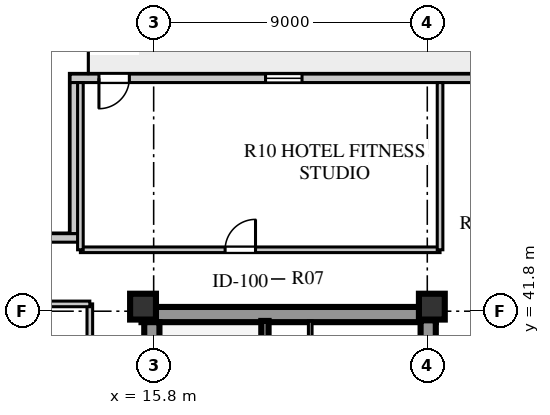
"""IFC4 building model, lengths in metres.
Left out: names, types, materials, properties, quantities, classifications, styles, units other than length and angle.
Written with IfcOpenShell. Run it as: python <this file> out.ifc"""

import sys

from ifc_helpers import new_model, si_unit, direction, frame, frame_2d, origin, origin_2d, place, context, subcontext, project, spatial, rectangle, extrude, element, fill, save


model = new_model("IFC4")
c1 = context("Model", 3, precision=1e-05, world=origin(), true_north=direction((0.0, 1.0)))
c2 = subcontext(c1, "Body", "Model", "MODEL_VIEW")
j1 = project(units=[si_unit("LENGTHUNIT", "METRE"), si_unit("PLANEANGLEUNIT", "RADIAN")], contexts=[c1])
p1 = place(None, origin())
s1 = spatial("IfcSite", under=j1, at=p1, CompositionType="ELEMENT")
p2 = place(p1, origin())
s2 = spatial("IfcBuilding", under=s1, at=p2, CompositionType="ELEMENT")
p3 = place(p2, frame((0.0, 0.0, 157.9)))
s3 = spatial("IfcBuildingStorey", under=s2, at=p3, CompositionType="ELEMENT", Elevation=157.9)
p4 = place(p3, frame((15.4, 41.69, 0.0), z_axis=(0.0, 0.0, 1.0), x_axis=(1.0, 0.0, 0.0)))
e1 = element("IfcWall", 1, at=p4, inside=s3, PredefinedType="SHEAR", context=c2, shape_type="SweptSolid", body=[
    extrude(rectangle(XDim=9.68, YDim=0.5, at=frame_2d((4.84, 0.0))), origin(), (0.0, 0.0, 1.0), 3.6),
])
p5 = place(p3, frame((15.74, 15.81, 0.0), z_axis=(0.0, 0.0, 1.0), x_axis=(0.0, 1.0, 0.0)))
e2 = element("IfcWall", 2, at=p5, inside=s3, PredefinedType="SHEAR", context=c2, shape_type="SweptSolid", body=[
    extrude(rectangle(XDim=25.63, YDim=0.5, at=frame_2d((12.815, 0.0))), origin(), (0.0, 0.0, 1.0), 3.6),
])
p6 = place(p3, frame((24.83, 15.74, 0.0), z_axis=(0.0, 0.0, 1.0), x_axis=(0.0, 1.0, 0.0)))
e3 = element("IfcWall", 3, at=p6, inside=s3, PredefinedType="SHEAR", context=c2, shape_type="SweptSolid", body=[
    extrude(rectangle(XDim=25.76, YDim=0.5, at=frame_2d((12.88, 0.0))), origin(), (0.0, 0.0, 1.0), 3.6),
])
p7 = place(p6, frame((1.61, 0.0, 0.0)))
e4 = element("IfcOpeningElement", 4, at=p7, cuts=e3, PredefinedType="OPENING", context=c2, shape_type="SweptSolid", body=[
    extrude(rectangle(XDim=1.2, YDim=2.1, at=frame_2d((0.6, 1.05))), frame((0.0, 0.26, 0.0), z_axis=(0.0, -1.0, 0.0), x_axis=(1.0, 0.0, 0.0)), (0.0, 0.0, 1.0), 0.52),
])
p8 = place(p6, frame((6.78, 0.0, 0.0)))
e5 = element("IfcOpeningElement", 5, at=p8, cuts=e3, PredefinedType="OPENING", context=c2, shape_type="SweptSolid", body=[
    extrude(rectangle(XDim=0.85, YDim=2.06, at=frame_2d((0.425, 1.03))), frame((0.0, 0.26, 0.0), z_axis=(0.0, -1.0, 0.0), x_axis=(1.0, 0.0, 0.0)), (0.0, 0.0, 1.0), 0.52),
])
p9 = place(p6, frame((12.11, 0.0, 0.0)))
e6 = element("IfcOpeningElement", 6, at=p9, cuts=e3, PredefinedType="OPENING", context=c2, shape_type="SweptSolid", body=[
    extrude(rectangle(XDim=1.5, YDim=2.12, at=frame_2d((0.75, 1.06))), frame((0.0, 0.26, 0.0), z_axis=(0.0, -1.0, 0.0), x_axis=(1.0, 0.0, 0.0)), (0.0, 0.0, 1.0), 0.52),
])
p10 = place(p6, frame((20.11, 0.0, 0.0)))
e7 = element("IfcOpeningElement", 7, at=p10, cuts=e3, PredefinedType="OPENING", context=c2, shape_type="SweptSolid", body=[
    extrude(rectangle(XDim=1.2, YDim=2.12, at=frame_2d((0.6, 1.06))), frame((0.0, 0.26, 0.0), z_axis=(0.0, -1.0, 0.0), x_axis=(1.0, 0.0, 0.0)), (0.0, 0.0, 1.0), 0.52),
])
p11 = place(p6, frame((24.01, 0.0, 0.0)))
e8 = element("IfcOpeningElement", 8, at=p11, cuts=e3, PredefinedType="OPENING", context=c2, shape_type="SweptSolid", body=[
    extrude(rectangle(XDim=0.95, YDim=2.1, at=frame_2d((0.475, 1.05))), frame((0.0, 0.26, 0.0), z_axis=(0.0, -1.0, 0.0), x_axis=(1.0, 0.0, 0.0)), (0.0, 0.0, 1.0), 0.52),
])
for number, where, z_axis, x_axis in (
    (9, (15.45, 41.95, 0.0), (0.0, 0.0, 1.0), (1.0, 0.0, 0.0)),
    (10, (24.95, 41.95, 0.0), (0.0, 0.0, 1.0), (1.0, 0.0, 0.0)),
):
    element("IfcColumn", number, at=place(p3, frame(where, z_axis=z_axis, x_axis=x_axis)), inside=s3, PredefinedType="COLUMN", context=c2, shape_type="SweptSolid", body=[
        extrude(rectangle(XDim=0.85, YDim=0.85, at=origin_2d()), origin(), (0.0, 0.0, 1.0), 3.6),
    ])
p12 = place(p3, frame((45.55, 49.46, 0.0), z_axis=(0.0, 0.0, 1.0), x_axis=(-1.0, 0.0, 0.0)))
e11 = element("IfcWall", 11, at=p12, inside=s3, PredefinedType="STANDARD", context=c2, shape_type="SweptSolid", body=[
    extrude(rectangle(XDim=32.5, YDim=0.28, at=frame_2d((16.25, 0.0))), origin(), (0.0, 0.0, 1.0), 3.6),
])
p13 = place(p12, frame((30.55, 0.0, 0.0)))
e12 = element("IfcOpeningElement", 12, at=p13, cuts=e11, PredefinedType="OPENING", context=c2, shape_type="SweptSolid", body=[
    extrude(rectangle(XDim=1.0, YDim=2.05, at=frame_2d((0.5, 1.025))), frame((0.0, 0.15, 0.0), z_axis=(0.0, -1.0, 0.0), x_axis=(1.0, 0.0, 0.0)), (0.0, 0.0, 1.0), 0.3),
])
p14 = place(p12, frame((24.87, 0.0, 0.8)))
e13 = element("IfcOpeningElement", 13, at=p14, cuts=e11, PredefinedType="OPENING", context=c2, shape_type="SweptSolid", body=[
    extrude(rectangle(XDim=1.2, YDim=1.75, at=frame_2d((0.6, 0.875))), frame((0.0, 0.15, 0.0), z_axis=(0.0, -1.0, 0.0), x_axis=(1.0, 0.0, 0.0)), (0.0, 0.0, 1.0), 0.3),
])
p15 = place(p12, frame((15.445, 0.0, 0.8)))
e14 = element("IfcOpeningElement", 14, at=p15, cuts=e11, PredefinedType="OPENING", context=c2, shape_type="SweptSolid", body=[
    extrude(rectangle(XDim=2.4, YDim=2.05, at=frame_2d((1.2, 1.025))), frame((0.0, 0.15, 0.0), z_axis=(0.0, -1.0, 0.0), x_axis=(1.0, 0.0, 0.0)), (0.0, 0.0, 1.0), 0.3),
])
p16 = place(p12, frame((11.295, 0.0, 0.8)))
e15 = element("IfcOpeningElement", 15, at=p16, cuts=e11, PredefinedType="OPENING", context=c2, shape_type="SweptSolid", body=[
    extrude(rectangle(XDim=1.2, YDim=1.75, at=frame_2d((0.6, 0.875))), frame((0.0, 0.15, 0.0), z_axis=(0.0, -1.0, 0.0), x_axis=(1.0, 0.0, 0.0)), (0.0, 0.0, 1.0), 0.3),
])
p17 = place(p12, frame((7.105, 0.0, 0.8)))
e16 = element("IfcOpeningElement", 16, at=p17, cuts=e11, PredefinedType="OPENING", context=c2, shape_type="SweptSolid", body=[
    extrude(rectangle(XDim=1.35, YDim=1.9, at=frame_2d((0.675, 0.95))), frame((0.0, 0.15, 0.0), z_axis=(0.0, -1.0, 0.0), x_axis=(1.0, 0.0, 0.0)), (0.0, 0.0, 1.0), 0.3),
])
p18 = place(p12, frame((1.595, 0.0, 0.8)))
e17 = element("IfcOpeningElement", 17, at=p18, cuts=e11, PredefinedType="OPENING", context=c2, shape_type="SweptSolid", body=[
    extrude(rectangle(XDim=1.65, YDim=1.95, at=frame_2d((0.825, 0.975))), frame((0.0, 0.15, 0.0), z_axis=(0.0, -1.0, 0.0), x_axis=(1.0, 0.0, 0.0)), (0.0, 0.0, 1.0), 0.3),
])
p19 = place(p3, frame((13.19, 49.32, 0.0), z_axis=(0.0, 0.0, 1.0), x_axis=(0.0, -1.0, 0.0)))
e18 = element("IfcWall", 18, at=p19, inside=s3, PredefinedType="STANDARD", context=c2, shape_type="SweptSolid", body=[
    extrude(rectangle(XDim=4.97, YDim=0.28, at=frame_2d((2.485, 0.0))), origin(), (0.0, 0.0, 1.0), 3.6),
])
p20 = place(p3, frame((13.33, 44.21, 0.0), z_axis=(0.0, 0.0, 1.0), x_axis=(-1.0, 0.0, 0.0)))
e19 = element("IfcWall", 19, at=p20, inside=s3, PredefinedType="STANDARD", context=c2, shape_type="SweptSolid", body=[
    extrude(rectangle(XDim=5.53, YDim=0.28, at=frame_2d((2.765, 0.0))), origin(), (0.0, 0.0, 1.0), 3.6),
])
p21 = place(p3, frame((19.46, 33.3, 0.0), z_axis=(0.0, 0.0, 1.0), x_axis=(0.0, 1.0, 0.0)))
e20 = element("IfcWall", 20, at=p21, inside=s3, PredefinedType="SHEAR", context=c2, shape_type="SweptSolid", body=[
    extrude(rectangle(XDim=8.18, YDim=0.24, at=frame_2d((4.09, 0.0))), origin(), (0.0, 0.0, 1.0), 3.85),
])
p22 = place(p21, frame((0.65, 0.0, 0.0)))
e21 = element("IfcOpeningElement", 21, at=p22, cuts=e20, PredefinedType="OPENING", context=c2, shape_type="SweptSolid", body=[
    extrude(rectangle(XDim=1.1, YDim=2.1, at=frame_2d((0.55, 1.05))), frame((0.0, 0.13, 0.0), z_axis=(0.0, -1.0, 0.0), x_axis=(1.0, 0.0, 0.0)), (0.0, 0.0, 1.0), 0.26),
])
p23 = place(p3, frame((20.95, 39.4, 0.0), z_axis=(0.0, 0.0, 1.0), x_axis=(0.0, 1.0, 0.0)))
e22 = element("IfcWall", 22, at=p23, inside=s3, PredefinedType="PARTITIONING", context=c2, shape_type="SweptSolid", body=[
    extrude(rectangle(XDim=2.08, YDim=0.12, at=frame_2d((1.04, 0.0))), origin(), (0.0, 0.0, 1.0), 3.6),
])
p24 = place(p23, frame((0.55, 0.0, 0.0)))
e23 = element("IfcOpeningElement", 23, at=p24, cuts=e22, PredefinedType="OPENING", context=c2, shape_type="SweptSolid", body=[
    extrude(rectangle(XDim=0.85, YDim=2.06, at=frame_2d((0.425, 1.03))), frame((0.0, 0.07, 0.0), z_axis=(0.0, -1.0, 0.0), x_axis=(1.0, 0.0, 0.0)), (0.0, 0.0, 1.0), 0.14),
])
p25 = place(p3, frame((13.7, 15.16, 0.0), z_axis=(0.0, 0.0, 1.0), x_axis=(0.0, 1.0, 0.0)))
e24 = element("IfcWall", 24, at=p25, inside=s3, PredefinedType="SOLIDWALL", context=c2, shape_type="SweptSolid", body=[
    extrude(rectangle(XDim=26.88, YDim=0.185, at=frame_2d((13.44, 0.0))), origin(), (0.0, 0.0, 1.0), 3.6),
])
p26 = place(p25, frame((0.91, 0.0, 0.0)))
e25 = element("IfcOpeningElement", 25, at=p26, cuts=e24, PredefinedType="OPENING", context=c2, shape_type="SweptSolid", body=[
    extrude(rectangle(XDim=0.95, YDim=2.1, at=frame_2d((0.475, 1.05))), frame((0.0, 0.103, 0.0), z_axis=(0.0, -1.0, 0.0), x_axis=(1.0, 0.0, 0.0)), (0.0, 0.0, 1.0), 0.205),
])
p27 = place(p25, frame((11.79, 0.0, 0.0)))
e26 = element("IfcOpeningElement", 26, at=p27, cuts=e24, PredefinedType="OPENING", context=c2, shape_type="SweptSolid", body=[
    extrude(rectangle(XDim=0.95, YDim=2.1, at=frame_2d((0.475, 1.05))), frame((0.0, 0.103, 0.0), z_axis=(0.0, -1.0, 0.0), x_axis=(1.0, 0.0, 0.0)), (0.0, 0.0, 1.0), 0.205),
])
p28 = place(p3, frame((8.08, 42.04, 0.0), z_axis=(0.0, 0.0, 1.0), x_axis=(1.0, 0.0, 0.0)))
e27 = element("IfcWall", 27, at=p28, inside=s3, PredefinedType="SOLIDWALL", context=c2, shape_type="SweptSolid", body=[
    extrude(rectangle(XDim=5.62, YDim=0.185, at=frame_2d((2.81, 0.0))), origin(), (0.0, 0.0, 1.0), 3.15),
])
p29 = place(p3, frame((13.39, 43.82, 0.0), z_axis=(0.0, 0.0, 1.0), x_axis=(1.0, 0.0, 0.0)))
e28 = element("IfcWall", 28, at=p29, inside=s3, PredefinedType="SOLIDWALL", context=c2, shape_type="SweptSolid", body=[
    extrude(rectangle(XDim=11.83, YDim=0.185, at=frame_2d((5.915, 0.0))), origin(), (0.0, 0.0, 1.0), 3.6),
])
p30 = place(p29, frame((4.76, 0.0, 0.0)))
e29 = element("IfcOpeningElement", 29, at=p30, cuts=e28, PredefinedType="OPENING", context=c2, shape_type="SweptSolid", body=[
    extrude(rectangle(XDim=1.0, YDim=2.08, at=frame_2d((0.5, 1.04))), frame((0.0, 0.103, 0.0), z_axis=(0.0, -1.0, 0.0), x_axis=(1.0, 0.0, 0.0)), (0.0, 0.0, 1.0), 0.205),
])
p31 = place(p3, frame((13.39, 43.82, 0.0), z_axis=(0.0, 0.0, 1.0), x_axis=(0.0, 1.0, 0.0)))
e30 = element("IfcWall", 30, at=p31, inside=s3, PredefinedType="SOLIDWALL", context=c2, shape_type="SweptSolid", body=[
    extrude(rectangle(XDim=5.5, YDim=0.185, at=frame_2d((2.75, 0.0))), origin(), (0.0, 0.0, 1.0), 3.6),
])
p32 = place(p3, frame((25.22, 43.82, 0.0), z_axis=(0.0, 0.0, 1.0), x_axis=(0.0, 1.0, 0.0)))
e31 = element("IfcWall", 31, at=p32, inside=s3, PredefinedType="SOLIDWALL", context=c2, shape_type="SweptSolid", body=[
    extrude(rectangle(XDim=5.5, YDim=0.185, at=frame_2d((2.75, 0.0))), origin(), (0.0, 0.0, 1.0), 3.15),
])
p33 = place(p13, frame((1.0, 0.0, 0.0), z_axis=(0.0, 0.0, 1.0), x_axis=(-1.0, 0.0, 0.0)))
e32 = element("IfcDoor", 32, at=p33, inside=s3, OperationType="SINGLE_SWING_LEFT", PredefinedType="DOOR", context=c2, shape_type="SweptSolid", body=[
    extrude(rectangle(XDim=1.0, YDim=2.05, at=frame_2d((0.5, 1.025))), frame((0.0, 0.025, 0.0), z_axis=(0.0, -1.0, 0.0), x_axis=(1.0, 0.0, 0.0)), (0.0, 0.0, 1.0), 0.05),
])
fill(e12, e32)
p34 = place(p14, origin())
e33 = element("IfcWindow", 33, at=p34, inside=s3, PartitioningType="SINGLE_PANEL", PredefinedType="WINDOW", context=c2, shape_type="SweptSolid", body=[
    extrude(rectangle(XDim=1.2, YDim=1.75, at=frame_2d((0.6, 0.875))), frame((0.0, 0.03, 0.0), z_axis=(0.0, -1.0, 0.0), x_axis=(1.0, 0.0, 0.0)), (0.0, 0.0, 1.0), 0.06),
])
fill(e13, e33)
p35 = place(p30, origin())
e34 = element("IfcDoor", 34, at=p35, inside=s3, OperationType="SINGLE_SWING_RIGHT", PredefinedType="DOOR", context=c2, shape_type="SweptSolid", body=[
    extrude(rectangle(XDim=1.0, YDim=2.08, at=frame_2d((0.5, 1.04))), frame((0.0, 0.025, 0.0), z_axis=(0.0, -1.0, 0.0), x_axis=(1.0, 0.0, 0.0)), (0.0, 0.0, 1.0), 0.05),
])
fill(e29, e34)
save(model, sys.argv[1])
